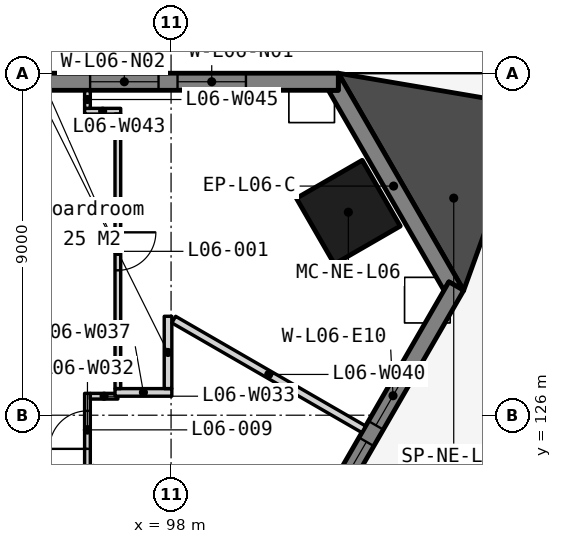
"""IFC4 building model, lengths in metres.
Left out: names, types, materials, properties, quantities, classifications, styles, units other than length and angle.
Written with IfcOpenShell. Run it as: python <this file> out.ifc"""

import sys

from ifc_helpers import new_model, si_unit, direction, frame, frame_2d, origin, origin_2d, place, context, subcontext, project, spatial, polyline, rectangle, outline, extrude, element, fill, save


model = new_model("IFC4")
c1 = context("Model", 3, precision=1e-05, world=origin(), true_north=direction((0.0, 1.0)))
c2 = subcontext(c1, "Body", "Model", "MODEL_VIEW")
j1 = project(units=[si_unit("LENGTHUNIT", "METRE"), si_unit("PLANEANGLEUNIT", "RADIAN")], contexts=[c1])
p1 = place(None, origin())
s1 = spatial("IfcSite", under=j1, at=p1, CompositionType="ELEMENT")
p2 = place(p1, origin())
s2 = spatial("IfcBuilding", under=s1, at=p2, CompositionType="ELEMENT")
p3 = place(p2, frame((0.0, 0.0, 35.0)))
s3 = spatial("IfcBuildingStorey", under=s2, at=p3, CompositionType="ELEMENT", Elevation=35.0)
p4 = place(p3, frame((102.664, 131.342, 0.0), z_axis=(0.0, 0.0, 1.0), x_axis=(-0.5, 0.866025403784, 0.0)))
e1 = element("IfcColumn", 1, at=p4, inside=s3, PredefinedType="COLUMN", context=c2, shape_type="SweptSolid", body=[
    extrude(rectangle(XDim=2.0, YDim=2.0, at=origin_2d()), origin(), (0.0, 0.0, 1.0), 3.5),
])
p5 = place(p3, frame((0.0, 0.0, -0.2)))
e2 = element("IfcWall", 2, at=p5, inside=s3, PredefinedType="SOLIDWALL", context=c2, shape_type="SweptSolid", body=[
    extrude(outline(polyline([(105.7, 129.284), (105.31, 129.509), (105.18, 129.284), (102.14, 134.55), (102.4, 134.55), (102.4, 135.0), (105.7, 129.284)])), origin(), (0.0, 0.0, 1.0), 3.55),
])
p6 = place(p3, frame((102.4, 134.775, -0.2), z_axis=(0.0, 0.0, 1.0), x_axis=(-1.0, 0.0, 0.0)))
e3 = element("IfcWall", 3, at=p6, inside=s3, PredefinedType="SOLIDWALL", context=c2, shape_type="SweptSolid", body=[
    extrude(outline(polyline([(44.8, 0.0), (44.8, 3.55), (0.0, 3.55), (0.0, 0.0), (44.8, 0.0)])), frame((0.0, 0.225, 0.0), z_axis=(0.0, -1.0, 0.0), x_axis=(1.0, 0.0, 0.0)), (0.0, 0.0, 1.0), 0.45),
])
p7 = place(p6, frame((2.43, 0.0, 1.1)))
e4 = element("IfcOpeningElement", 4, at=p7, cuts=e3, PredefinedType="OPENING", context=c2, shape_type="SweptSolid", body=[
    extrude(rectangle(XDim=1.8, YDim=1.5, at=frame_2d((0.9, 0.75))), frame((0.0, 0.235, 0.0), z_axis=(0.0, -1.0, 0.0), x_axis=(1.0, 0.0, 0.0)), (0.0, 0.0, 1.0), 0.47),
])
p8 = place(p6, frame((4.73, 0.0, 1.1)))
e5 = element("IfcOpeningElement", 5, at=p8, cuts=e3, PredefinedType="OPENING", context=c2, shape_type="SweptSolid", body=[
    extrude(rectangle(XDim=1.8, YDim=1.5, at=frame_2d((0.9, 0.75))), frame((0.0, 0.235, 0.0), z_axis=(0.0, -1.0, 0.0), x_axis=(1.0, 0.0, 0.0)), (0.0, 0.0, 1.0), 0.47),
])
p9 = place(p6, frame((11.39, 0.0, 1.1)))
e6 = element("IfcOpeningElement", 6, at=p9, cuts=e3, PredefinedType="OPENING", context=c2, shape_type="SweptSolid", body=[
    extrude(rectangle(XDim=1.8, YDim=1.5, at=frame_2d((0.9, 0.75))), frame((0.0, 0.235, 0.0), z_axis=(0.0, -1.0, 0.0), x_axis=(1.0, 0.0, 0.0)), (0.0, 0.0, 1.0), 0.47),
])
p10 = place(p6, frame((13.69, 0.0, 1.1)))
e7 = element("IfcOpeningElement", 7, at=p10, cuts=e3, PredefinedType="OPENING", context=c2, shape_type="SweptSolid", body=[
    extrude(rectangle(XDim=1.8, YDim=1.5, at=frame_2d((0.9, 0.75))), frame((0.0, 0.235, 0.0), z_axis=(0.0, -1.0, 0.0), x_axis=(1.0, 0.0, 0.0)), (0.0, 0.0, 1.0), 0.47),
])
p11 = place(p6, frame((20.35, 0.0, 1.1)))
e8 = element("IfcOpeningElement", 8, at=p11, cuts=e3, PredefinedType="OPENING", context=c2, shape_type="SweptSolid", body=[
    extrude(rectangle(XDim=1.8, YDim=1.5, at=frame_2d((0.9, 0.75))), frame((0.0, 0.235, 0.0), z_axis=(0.0, -1.0, 0.0), x_axis=(1.0, 0.0, 0.0)), (0.0, 0.0, 1.0), 0.47),
])
p12 = place(p6, frame((22.65, 0.0, 1.1)))
e9 = element("IfcOpeningElement", 9, at=p12, cuts=e3, PredefinedType="OPENING", context=c2, shape_type="SweptSolid", body=[
    extrude(rectangle(XDim=1.8, YDim=1.5, at=frame_2d((0.9, 0.75))), frame((0.0, 0.235, 0.0), z_axis=(0.0, -1.0, 0.0), x_axis=(1.0, 0.0, 0.0)), (0.0, 0.0, 1.0), 0.47),
])
p13 = place(p6, frame((29.31, 0.0, 1.1)))
e10 = element("IfcOpeningElement", 10, at=p13, cuts=e3, PredefinedType="OPENING", context=c2, shape_type="SweptSolid", body=[
    extrude(rectangle(XDim=1.8, YDim=1.5, at=frame_2d((0.9, 0.75))), frame((0.0, 0.235, 0.0), z_axis=(0.0, -1.0, 0.0), x_axis=(1.0, 0.0, 0.0)), (0.0, 0.0, 1.0), 0.47),
])
p14 = place(p6, frame((31.61, 0.0, 1.1)))
e11 = element("IfcOpeningElement", 11, at=p14, cuts=e3, PredefinedType="OPENING", context=c2, shape_type="SweptSolid", body=[
    extrude(rectangle(XDim=1.8, YDim=1.5, at=frame_2d((0.9, 0.75))), frame((0.0, 0.235, 0.0), z_axis=(0.0, -1.0, 0.0), x_axis=(1.0, 0.0, 0.0)), (0.0, 0.0, 1.0), 0.47),
])
p15 = place(p6, frame((38.27, 0.0, 1.1)))
e12 = element("IfcOpeningElement", 12, at=p15, cuts=e3, PredefinedType="OPENING", context=c2, shape_type="SweptSolid", body=[
    extrude(rectangle(XDim=1.8, YDim=1.5, at=frame_2d((0.9, 0.75))), frame((0.0, 0.235, 0.0), z_axis=(0.0, -1.0, 0.0), x_axis=(1.0, 0.0, 0.0)), (0.0, 0.0, 1.0), 0.47),
])
p16 = place(p6, frame((40.57, 0.0, 1.1)))
e13 = element("IfcOpeningElement", 13, at=p16, cuts=e3, PredefinedType="OPENING", context=c2, shape_type="SweptSolid", body=[
    extrude(rectangle(XDim=1.8, YDim=1.5, at=frame_2d((0.9, 0.75))), frame((0.0, 0.235, 0.0), z_axis=(0.0, -1.0, 0.0), x_axis=(1.0, 0.0, 0.0)), (0.0, 0.0, 1.0), 0.47),
])
p17 = place(p3, frame((83.105, 90.599, -0.2), z_axis=(0.0, 0.0, 1.0), x_axis=(0.499999201451, 0.866025864826, 0.0)))
e14 = element("IfcWall", 14, at=p17, inside=s3, PredefinedType="SOLIDWALL", context=c2, shape_type="SweptSolid", body=[
    extrude(outline(polyline([(44.8, 0.0), (44.8, 3.55), (0.0, 3.55), (0.0, 0.0), (44.8, 0.0)])), frame((0.0, 0.225, 0.0), z_axis=(0.0, -1.0, 0.0), x_axis=(1.0, 0.0, 0.0)), (0.0, 0.0, 1.0), 0.45),
])
p18 = place(p17, frame((2.43, 0.0, 1.1)))
e15 = element("IfcOpeningElement", 15, at=p18, cuts=e14, PredefinedType="OPENING", context=c2, shape_type="SweptSolid", body=[
    extrude(rectangle(XDim=1.8, YDim=1.5, at=frame_2d((0.9, 0.75))), frame((0.0, 0.235, 0.0), z_axis=(0.0, -1.0, 0.0), x_axis=(1.0, 0.0, 0.0)), (0.0, 0.0, 1.0), 0.47),
])
p19 = place(p17, frame((4.73, 0.0, 0.2)))
e16 = element("IfcOpeningElement", 16, at=p19, cuts=e14, PredefinedType="OPENING", context=c2, shape_type="SweptSolid", body=[
    extrude(rectangle(XDim=1.8, YDim=2.4, at=frame_2d((0.9, 1.2))), frame((0.0, 0.235, 0.0), z_axis=(0.0, -1.0, 0.0), x_axis=(1.0, 0.0, 0.0)), (0.0, 0.0, 1.0), 0.47),
])
p20 = place(p17, frame((11.39, 0.0, 1.1)))
e17 = element("IfcOpeningElement", 17, at=p20, cuts=e14, PredefinedType="OPENING", context=c2, shape_type="SweptSolid", body=[
    extrude(rectangle(XDim=1.8, YDim=1.5, at=frame_2d((0.9, 0.75))), frame((0.0, 0.235, 0.0), z_axis=(0.0, -1.0, 0.0), x_axis=(1.0, 0.0, 0.0)), (0.0, 0.0, 1.0), 0.47),
])
p21 = place(p17, frame((13.69, 0.0, 1.1)))
e18 = element("IfcOpeningElement", 18, at=p21, cuts=e14, PredefinedType="OPENING", context=c2, shape_type="SweptSolid", body=[
    extrude(rectangle(XDim=1.8, YDim=1.5, at=frame_2d((0.9, 0.75))), frame((0.0, 0.235, 0.0), z_axis=(0.0, -1.0, 0.0), x_axis=(1.0, 0.0, 0.0)), (0.0, 0.0, 1.0), 0.47),
])
p22 = place(p17, frame((20.35, 0.0, 0.2)))
e19 = element("IfcOpeningElement", 19, at=p22, cuts=e14, PredefinedType="OPENING", context=c2, shape_type="SweptSolid", body=[
    extrude(rectangle(XDim=1.8, YDim=2.4, at=frame_2d((0.9, 1.2))), frame((0.0, 0.235, 0.0), z_axis=(0.0, -1.0, 0.0), x_axis=(1.0, 0.0, 0.0)), (0.0, 0.0, 1.0), 0.47),
])
p23 = place(p17, frame((22.65, 0.0, 1.1)))
e20 = element("IfcOpeningElement", 20, at=p23, cuts=e14, PredefinedType="OPENING", context=c2, shape_type="SweptSolid", body=[
    extrude(rectangle(XDim=1.8, YDim=1.5, at=frame_2d((0.9, 0.75))), frame((0.0, 0.235, 0.0), z_axis=(0.0, -1.0, 0.0), x_axis=(1.0, 0.0, 0.0)), (0.0, 0.0, 1.0), 0.47),
])
p24 = place(p17, frame((29.31, 0.0, 1.1)))
e21 = element("IfcOpeningElement", 21, at=p24, cuts=e14, PredefinedType="OPENING", context=c2, shape_type="SweptSolid", body=[
    extrude(rectangle(XDim=1.8, YDim=1.5, at=frame_2d((0.9, 0.75))), frame((0.0, 0.235, 0.0), z_axis=(0.0, -1.0, 0.0), x_axis=(1.0, 0.0, 0.0)), (0.0, 0.0, 1.0), 0.47),
])
p25 = place(p17, frame((31.61, 0.0, 0.2)))
e22 = element("IfcOpeningElement", 22, at=p25, cuts=e14, PredefinedType="OPENING", context=c2, shape_type="SweptSolid", body=[
    extrude(rectangle(XDim=1.8, YDim=2.4, at=frame_2d((0.9, 1.2))), frame((0.0, 0.235, 0.0), z_axis=(0.0, -1.0, 0.0), x_axis=(1.0, 0.0, 0.0)), (0.0, 0.0, 1.0), 0.47),
])
p26 = place(p17, frame((38.27, 0.0, 1.1)))
e23 = element("IfcOpeningElement", 23, at=p26, cuts=e14, PredefinedType="OPENING", context=c2, shape_type="SweptSolid", body=[
    extrude(rectangle(XDim=1.8, YDim=1.5, at=frame_2d((0.9, 0.75))), frame((0.0, 0.235, 0.0), z_axis=(0.0, -1.0, 0.0), x_axis=(1.0, 0.0, 0.0)), (0.0, 0.0, 1.0), 0.47),
])
p27 = place(p17, frame((40.57, 0.0, 1.1)))
e24 = element("IfcOpeningElement", 24, at=p27, cuts=e14, PredefinedType="OPENING", context=c2, shape_type="SweptSolid", body=[
    extrude(rectangle(XDim=1.8, YDim=1.5, at=frame_2d((0.9, 0.75))), frame((0.0, 0.235, 0.0), z_axis=(0.0, -1.0, 0.0), x_axis=(1.0, 0.0, 0.0)), (0.0, 0.0, 1.0), 0.47),
])
p28 = place(p3, frame((110.208, 129.091, 0.0), z_axis=(0.0, 0.0, 1.0), x_axis=(-0.500001932243, -0.8660242882, 0.0)))
e25 = element("IfcWall", 25, at=p28, inside=s3, PredefinedType="STANDARD", context=c2, shape_type="SweptSolid", body=[
    extrude(rectangle(XDim=54.747, YDim=1.0, at=frame_2d((27.374, 0.0))), origin(), (0.0, 0.0, 1.0), 0.6),
])
p29 = place(p3, frame((0.0, 0.0, 0.04)))
e26 = element("IfcWall", 26, at=p29, inside=s3, PredefinedType="SOLIDWALL", context=c2, shape_type="SweptSolid", body=[
    extrude(outline(polyline([(105.7, 129.284), (107.455, 134.141), (102.4, 135.0), (105.7, 129.284)])), origin(), (0.0, 0.0, 1.0), 3.31),
])
p30 = place(p3, frame((95.8, 124.654, 0.0), z_axis=(0.0, 0.0, 1.0), x_axis=(0.0, 1.0, 0.0)))
e27 = element("IfcWall", 27, at=p30, inside=s3, PredefinedType="PARTITIONING", context=c2, shape_type="SweptSolid", body=[
    extrude(rectangle(XDim=1.921, YDim=0.15, at=frame_2d((0.96, 0.0))), origin(), (0.0, 0.0, 1.0), 3.35),
])
p31 = place(p30, frame((0.46, 0.0, 0.0)))
e28 = element("IfcOpeningElement", 28, at=p31, cuts=e27, PredefinedType="OPENING", context=c2, shape_type="SweptSolid", body=[
    extrude(rectangle(XDim=1.0, YDim=2.1, at=frame_2d((0.5, 1.05))), frame((0.0, 0.085, 0.0), z_axis=(0.0, -1.0, 0.0), x_axis=(1.0, 0.0, 0.0)), (0.0, 0.0, 1.0), 0.17),
])
p32 = place(p3, frame((95.875, 126.5, 0.0), z_axis=(0.0, 0.0, 1.0), x_axis=(1.0, 0.0, 0.0)))
e29 = element("IfcWall", 29, at=p32, inside=s3, PredefinedType="PARTITIONING", context=c2, shape_type="SweptSolid", body=[
    extrude(rectangle(XDim=0.725, YDim=0.15, at=frame_2d((0.363, 0.0))), origin(), (0.0, 0.0, 1.0), 3.35),
])
p33 = place(p3, frame((96.525, 126.6, 0.0), z_axis=(0.0, 0.0, 1.0), x_axis=(1.0, 0.0, 0.0)))
e30 = element("IfcWall", 30, at=p33, inside=s3, PredefinedType="PARTITIONING", context=c2, shape_type="SweptSolid", body=[
    extrude(rectangle(XDim=1.495, YDim=0.2, at=frame_2d((0.748, 0.0))), origin(), (0.0, 0.0, 1.0), 3.35),
])
p34 = place(p3, frame((97.92, 126.7, 0.0), z_axis=(0.0, 0.0, 1.0), x_axis=(0.0, 1.0, 0.0)))
e31 = element("IfcWall", 31, at=p34, inside=s3, PredefinedType="PARTITIONING", context=c2, shape_type="SweptSolid", body=[
    extrude(rectangle(XDim=1.903, YDim=0.2, at=frame_2d((0.952, 0.0))), origin(), (0.0, 0.0, 1.0), 3.35),
])
p35 = place(p3, frame((98.07, 128.516, 0.0), z_axis=(0.0, 0.0, 1.0), x_axis=(0.866020109775, -0.500009169381, 0.0)))
e32 = element("IfcWall", 32, at=p35, inside=s3, PredefinedType="PARTITIONING", context=c2, shape_type="SweptSolid", body=[
    extrude(rectangle(XDim=5.774, YDim=0.2, at=frame_2d((2.887, 0.0))), origin(), (0.0, 0.0, 1.0), 3.35),
])
p36 = place(p3, frame((95.725, 134.0, 0.0), z_axis=(0.0, 0.0, 1.0), x_axis=(1.0, 0.0, 0.0)))
e33 = element("IfcWall", 33, at=p36, inside=s3, PredefinedType="PARTITIONING", context=c2, shape_type="SweptSolid", body=[
    extrude(rectangle(XDim=0.949, YDim=0.15, at=frame_2d((0.475, 0.0))), origin(), (0.0, 0.0, 1.0), 2.887),
])
p37 = place(p3, frame((96.6, 133.925, 0.0), z_axis=(0.0, 0.0, 1.0), x_axis=(6.7581266e-05, -0.999999997716, 0.0)))
e34 = element("IfcWall", 34, at=p37, inside=s3, PredefinedType="PARTITIONING", context=c2, shape_type="SweptSolid", body=[
    extrude(rectangle(XDim=7.225, YDim=0.15, at=frame_2d((3.613, 0.0))), origin(), (0.0, 0.0, 1.0), 3.35),
])
p38 = place(p37, frame((3.113, 0.0, 0.0)))
e35 = element("IfcOpeningElement", 35, at=p38, cuts=e34, PredefinedType="OPENING", context=c2, shape_type="SweptSolid", body=[
    extrude(rectangle(XDim=1.0, YDim=2.1, at=frame_2d((0.5, 1.05))), frame((0.0, 0.085, 0.0), z_axis=(0.0, -1.0, 0.0), x_axis=(1.0, 0.0, 0.0)), (0.0, 0.0, 1.0), 0.17),
])
p39 = place(p3, frame((95.8, 134.075, 0.0), z_axis=(0.0, 0.0, 1.0), x_axis=(0.0, 1.0, 0.0)))
e36 = element("IfcWall", 36, at=p39, inside=s3, PredefinedType="PARTITIONING", context=c2, shape_type="SweptSolid", body=[
    extrude(rectangle(XDim=0.465, YDim=0.15, at=frame_2d((0.232, 0.0))), origin(), (0.0, 0.0, 1.0), 3.35),
])
p40 = place(p7, origin())
e37 = element("IfcWindow", 37, at=p40, inside=s3, PartitioningType="SINGLE_PANEL", PredefinedType="WINDOW", context=c2, shape_type="SweptSolid", body=[
    extrude(rectangle(XDim=1.8, YDim=1.5, at=frame_2d((0.9, 0.75))), frame((0.0, 0.03, 0.0), z_axis=(0.0, -1.0, 0.0), x_axis=(1.0, 0.0, 0.0)), (0.0, 0.0, 1.0), 0.06),
])
fill(e4, e37)
p41 = place(p8, origin())
e38 = element("IfcWindow", 38, at=p41, inside=s3, PartitioningType="SINGLE_PANEL", PredefinedType="WINDOW", context=c2, shape_type="SweptSolid", body=[
    extrude(rectangle(XDim=1.8, YDim=1.5, at=frame_2d((0.9, 0.75))), frame((0.0, 0.03, 0.0), z_axis=(0.0, -1.0, 0.0), x_axis=(1.0, 0.0, 0.0)), (0.0, 0.0, 1.0), 0.06),
])
fill(e5, e38)
p42 = place(p26, origin())
e39 = element("IfcWindow", 39, at=p42, inside=s3, PartitioningType="SINGLE_PANEL", PredefinedType="WINDOW", context=c2, shape_type="SweptSolid", body=[
    extrude(rectangle(XDim=1.8, YDim=1.5, at=frame_2d((0.9, 0.75))), frame((0.0, 0.03, 0.0), z_axis=(0.0, -1.0, 0.0), x_axis=(1.0, 0.0, 0.0)), (0.0, 0.0, 1.0), 0.06),
])
fill(e23, e39)
p43 = place(p27, origin())
e40 = element("IfcWindow", 40, at=p43, inside=s3, PartitioningType="SINGLE_PANEL", PredefinedType="WINDOW", context=c2, shape_type="SweptSolid", body=[
    extrude(rectangle(XDim=1.8, YDim=1.5, at=frame_2d((0.9, 0.75))), frame((0.0, 0.03, 0.0), z_axis=(0.0, -1.0, 0.0), x_axis=(1.0, 0.0, 0.0)), (0.0, 0.0, 1.0), 0.06),
])
fill(e24, e40)
p44 = place(p38, origin())
e41 = element("IfcDoor", 41, at=p44, inside=s3, OperationType="SINGLE_SWING_LEFT", PredefinedType="DOOR", context=c2, shape_type="SweptSolid", body=[
    extrude(rectangle(XDim=1.0, YDim=2.1, at=frame_2d((0.5, 1.05))), frame((0.0, 0.025, 0.0), z_axis=(0.0, -1.0, 0.0), x_axis=(1.0, 0.0, 0.0)), (0.0, 0.0, 1.0), 0.05),
])
fill(e35, e41)
p45 = place(p31, origin())
e42 = element("IfcDoor", 42, at=p45, inside=s3, OperationType="SINGLE_SWING_LEFT", PredefinedType="DOOR", context=c2, shape_type="SweptSolid", body=[
    extrude(rectangle(XDim=1.0, YDim=2.1, at=frame_2d((0.5, 1.05))), frame((0.0, 0.025, 0.0), z_axis=(0.0, -1.0, 0.0), x_axis=(1.0, 0.0, 0.0)), (0.0, 0.0, 1.0), 0.05),
])
fill(e28, e42)
save(model, sys.argv[1])
